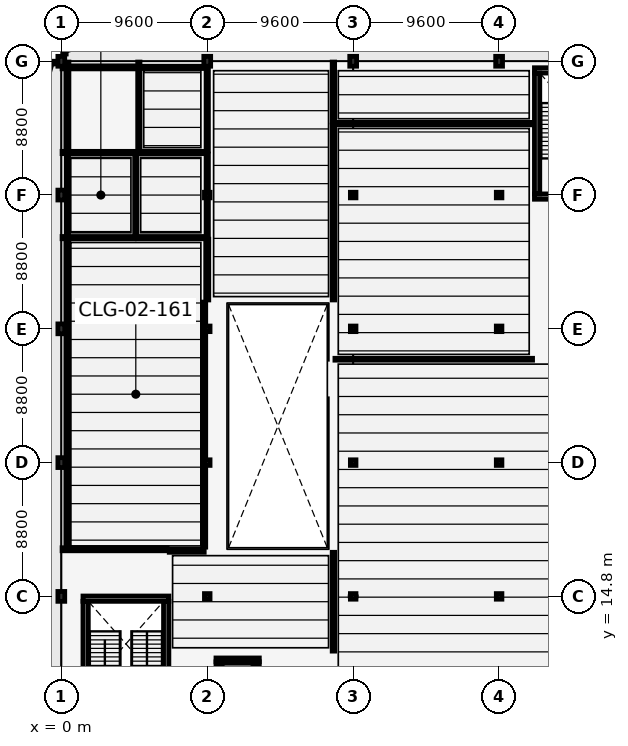
"""IFC4 building model, lengths in metres.
Left out: names, types, materials, properties, quantities, classifications, styles, units other than length and angle.
Written with IfcOpenShell. Run it as: python <this file> out.ifc"""

import sys

from ifc_helpers import new_model, si_unit, direction, frame, frame_2d, origin, origin_2d, place, context, subcontext, project, spatial, rectangle, i_section, extrude, element, fill, save


model = new_model("IFC4")
c1 = context("Model", 3, precision=1e-05, world=origin(), true_north=direction((0.0, 1.0)))
c2 = subcontext(c1, "Body", "Model", "MODEL_VIEW")
j1 = project(units=[si_unit("LENGTHUNIT", "METRE"), si_unit("PLANEANGLEUNIT", "RADIAN")], contexts=[c1])
p1 = place(None, origin())
s1 = spatial("IfcSite", under=j1, at=p1, CompositionType="ELEMENT")
p2 = place(p1, origin())
s2 = spatial("IfcBuilding", under=s1, at=p2, CompositionType="ELEMENT")
p3 = place(p2, frame((0.0, 0.0, 4.8)))
s3 = spatial("IfcBuildingStorey", under=s2, at=p3, CompositionType="ELEMENT", Elevation=4.8)
for number, where, z_axis, x_axis in (
    (1, (0.0, 14.8, 0.0), (0.0, 0.0, 1.0), (1.0, 0.0, 0.0)),
    (2, (0.0, 23.6, 0.0), (0.0, 0.0, 1.0), (1.0, 0.0, 0.0)),
    (3, (0.0, 32.4, 0.0), (0.0, 0.0, 1.0), (1.0, 0.0, 0.0)),
    (4, (0.0, 41.2, 0.0), (0.0, 0.0, 1.0), (1.0, 0.0, 0.0)),
    (5, (0.0, 50.0, 0.0), (0.0, 0.0, 1.0), (1.0, 0.0, 0.0)),
):
    element("IfcColumn", number, at=place(p3, frame(where, z_axis=z_axis, x_axis=x_axis)), inside=s3, PredefinedType="COLUMN", context=c2, shape_type="SweptSolid", body=[
        extrude(rectangle(XDim=0.45, YDim=0.65, at=origin_2d()), origin(), (0.0, 0.0, 1.0), 4.8),
    ])
for number, where, z_axis, x_axis in (
    (6, (9.6, 14.8, 0.0), (0.0, 0.0, 1.0), (1.0, 0.0, 0.0)),
    (7, (9.6, 23.6, 0.0), (0.0, 0.0, 1.0), (1.0, 0.0, 0.0)),
    (8, (9.6, 32.4, 0.0), (0.0, 0.0, 1.0), (1.0, 0.0, 0.0)),
    (9, (9.6, 41.2, 0.0), (0.0, 0.0, 1.0), (1.0, 0.0, 0.0)),
):
    element("IfcColumn", number, at=place(p3, frame(where, z_axis=z_axis, x_axis=x_axis)), inside=s3, PredefinedType="COLUMN", context=c2, shape_type="SweptSolid", body=[
        extrude(i_section(OverallWidth=0.368, OverallDepth=0.368, WebThickness=0.015, FlangeThickness=0.024, FilletRadius=0.025, at=origin_2d()), origin(), (0.0, 0.0, 1.0), 4.8),
    ])
p4 = place(p3, frame((9.6, 50.0, 0.0), z_axis=(0.0, 0.0, 1.0), x_axis=(1.0, 0.0, 0.0)))
e10 = element("IfcColumn", 10, at=p4, inside=s3, PredefinedType="COLUMN", context=c2, shape_type="SweptSolid", body=[
    extrude(rectangle(XDim=0.45, YDim=0.65, at=origin_2d()), origin(), (0.0, 0.0, 1.0), 4.8),
])
for number, where, z_axis, x_axis in (
    (11, (19.2, 14.8, 0.0), (0.0, 0.0, 1.0), (1.0, 0.0, 0.0)),
    (12, (19.2, 23.6, 0.0), (0.0, 0.0, 1.0), (1.0, 0.0, 0.0)),
    (13, (19.2, 32.4, 0.0), (0.0, 0.0, 1.0), (1.0, 0.0, 0.0)),
    (14, (19.2, 41.2, 0.0), (0.0, 0.0, 1.0), (1.0, 0.0, 0.0)),
):
    element("IfcColumn", number, at=place(p3, frame(where, z_axis=z_axis, x_axis=x_axis)), inside=s3, PredefinedType="COLUMN", context=c2, shape_type="SweptSolid", body=[
        extrude(i_section(OverallWidth=0.368, OverallDepth=0.368, WebThickness=0.015, FlangeThickness=0.024, FilletRadius=0.025, at=origin_2d()), origin(), (0.0, 0.0, 1.0), 4.8),
    ])
p5 = place(p3, frame((19.2, 50.0, 0.0), z_axis=(0.0, 0.0, 1.0), x_axis=(1.0, 0.0, 0.0)))
e15 = element("IfcColumn", 15, at=p5, inside=s3, PredefinedType="COLUMN", context=c2, shape_type="SweptSolid", body=[
    extrude(rectangle(XDim=0.45, YDim=0.65, at=origin_2d()), origin(), (0.0, 0.0, 1.0), 4.8),
])
for number, where, z_axis, x_axis in (
    (16, (28.8, 14.8, 0.0), (0.0, 0.0, 1.0), (1.0, 0.0, 0.0)),
    (17, (28.8, 23.6, 0.0), (0.0, 0.0, 1.0), (1.0, 0.0, 0.0)),
    (18, (28.8, 32.4, 0.0), (0.0, 0.0, 1.0), (1.0, 0.0, 0.0)),
    (19, (28.8, 41.2, 0.0), (0.0, 0.0, 1.0), (1.0, 0.0, 0.0)),
):
    element("IfcColumn", number, at=place(p3, frame(where, z_axis=z_axis, x_axis=x_axis)), inside=s3, PredefinedType="COLUMN", context=c2, shape_type="SweptSolid", body=[
        extrude(i_section(OverallWidth=0.368, OverallDepth=0.368, WebThickness=0.015, FlangeThickness=0.024, FilletRadius=0.025, at=origin_2d()), origin(), (0.0, 0.0, 1.0), 4.8),
    ])
p6 = place(p3, frame((28.8, 50.0, 0.0), z_axis=(0.0, 0.0, 1.0), x_axis=(1.0, 0.0, 0.0)))
e20 = element("IfcColumn", 20, at=p6, inside=s3, PredefinedType="COLUMN", context=c2, shape_type="SweptSolid", body=[
    extrude(rectangle(XDim=0.45, YDim=0.65, at=origin_2d()), origin(), (0.0, 0.0, 1.0), 4.8),
])
p7 = place(p3, frame((1.425, 14.65, 0.0), z_axis=(0.0, 0.0, 1.0), x_axis=(1.0, 0.0, 0.0)))
e21 = element("IfcWall", 21, at=p7, inside=s3, PredefinedType="SHEAR", context=c2, shape_type="SweptSolid", body=[
    extrude(rectangle(XDim=5.65, YDim=0.35, at=frame_2d((2.825, 0.0))), origin(), (0.0, 0.0, 1.0), 4.55),
])
p8 = place(p3, frame((1.6, 6.525, 0.0), z_axis=(0.0, 0.0, 1.0), x_axis=(0.0, 1.0, 0.0)))
e22 = element("IfcWall", 22, at=p8, inside=s3, PredefinedType="SHEAR", context=c2, shape_type="SweptSolid", body=[
    extrude(rectangle(XDim=7.95, YDim=0.35, at=frame_2d((3.975, 0.0))), origin(), (0.0, 0.0, 1.0), 4.55),
])
p9 = place(p3, frame((6.9, 14.475, 0.0), z_axis=(0.0, 0.0, 1.0), x_axis=(0.0, -1.0, 0.0)))
e23 = element("IfcWall", 23, at=p9, inside=s3, PredefinedType="SHEAR", context=c2, shape_type="SweptSolid", body=[
    extrude(rectangle(XDim=7.95, YDim=0.35, at=frame_2d((3.975, 0.0))), origin(), (0.0, 0.0, 1.0), 4.55),
])
p10 = place(p9, frame((5.68, 0.0, 0.0)))
e24 = element("IfcOpeningElement", 24, at=p10, cuts=e23, PredefinedType="OPENING", context=c2, shape_type="SweptSolid", body=[
    extrude(rectangle(XDim=2.05, YDim=2.15, at=frame_2d((1.025, 1.075))), frame((0.0, 0.185, 0.0), z_axis=(0.0, -1.0, 0.0), x_axis=(1.0, 0.0, 0.0)), (0.0, 0.0, 1.0), 0.37),
])
for number, where, z_axis, x_axis in (
    (25, (36.775, 41.1, 0.0), (0.0, 0.0, 1.0), (-1.0, 0.0, 0.0)),
    (26, (31.125, 49.4, 0.0), (0.0, 0.0, 1.0), (1.0, 0.0, 0.0)),
):
    element("IfcWall", number, at=place(p3, frame(where, z_axis=z_axis, x_axis=x_axis)), inside=s3, PredefinedType="SHEAR", context=c2, shape_type="SweptSolid", body=[
        extrude(rectangle(XDim=5.65, YDim=0.35, at=frame_2d((2.825, 0.0))), origin(), (0.0, 0.0, 1.0), 4.55),
    ])
p11 = place(p3, frame((31.3, 41.275, 0.0), z_axis=(0.0, 0.0, 1.0), x_axis=(0.0, 1.0, 0.0)))
e27 = element("IfcWall", 27, at=p11, inside=s3, PredefinedType="SHEAR", context=c2, shape_type="SweptSolid", body=[
    extrude(rectangle(XDim=7.95, YDim=0.35, at=frame_2d((3.975, 0.0))), origin(), (0.0, 0.0, 1.0), 4.55),
])
p12 = place(p11, frame((0.22, 0.0, 0.0)))
e28 = element("IfcOpeningElement", 28, at=p12, cuts=e27, PredefinedType="OPENING", context=c2, shape_type="SweptSolid", body=[
    extrude(rectangle(XDim=2.05, YDim=2.15, at=frame_2d((1.025, 1.075))), frame((0.0, 0.185, 0.0), z_axis=(0.0, -1.0, 0.0), x_axis=(1.0, 0.0, 0.0)), (0.0, 0.0, 1.0), 0.37),
])
p13 = place(p3, frame((10.175, 10.625, 0.0), z_axis=(0.0, 0.0, 1.0), x_axis=(1.0, 0.0, 0.0)))
e29 = element("IfcWall", 29, at=p13, inside=s3, PredefinedType="SOLIDWALL", context=c2, shape_type="SweptSolid", body=[
    extrude(rectangle(XDim=2.85, YDim=0.25, at=frame_2d((1.425, 0.0))), origin(), (0.0, 0.0, 1.0), 4.55),
])
p14 = place(p13, frame((0.875, 0.0, 0.0)))
e30 = element("IfcOpeningElement", 30, at=p14, cuts=e29, PredefinedType="OPENING", context=c2, shape_type="SweptSolid", body=[
    extrude(rectangle(XDim=1.1, YDim=2.15, at=frame_2d((0.55, 1.075))), frame((0.0, 0.135, 0.0), z_axis=(0.0, -1.0, 0.0), x_axis=(1.0, 0.0, 0.0)), (0.0, 0.0, 1.0), 0.27),
])
for number, where, z_axis, x_axis in (
    (31, (10.3, 8.7, 0.0), (0.0, 0.0, 1.0), (0.0, 1.0, 0.0)),
    (32, (12.9, 10.5, 0.0), (0.0, 0.0, 1.0), (0.0, -1.0, 0.0)),
):
    element("IfcWall", number, at=place(p3, frame(where, z_axis=z_axis, x_axis=x_axis)), inside=s3, PredefinedType="SOLIDWALL", context=c2, shape_type="SweptSolid", body=[
        extrude(rectangle(XDim=1.8, YDim=0.25, at=frame_2d((0.9, 0.0))), origin(), (0.0, 0.0, 1.0), 4.55),
    ])
p15 = place(p3, frame((17.9, 11.2, 0.0), z_axis=(0.0, 0.0, 1.0), x_axis=(0.0, 1.0, 0.0)))
e33 = element("IfcWall", 33, at=p15, inside=s3, PredefinedType="PARTITIONING", context=c2, shape_type="SweptSolid", body=[
    extrude(rectangle(XDim=6.5, YDim=0.16, at=frame_2d((3.25, 0.0))), origin(), (0.0, 0.0, 1.0), 4.42),
])
p16 = place(p15, frame((0.559, 0.0, 0.0)))
e34 = element("IfcOpeningElement", 34, at=p16, cuts=e33, PredefinedType="OPENING", context=c2, shape_type="SweptSolid", body=[
    extrude(rectangle(XDim=1.8, YDim=2.15, at=frame_2d((0.9, 1.075))), frame((0.0, 0.09, 0.0), z_axis=(0.0, -1.0, 0.0), x_axis=(1.0, 0.0, 0.0)), (0.0, 0.0, 1.0), 0.18),
])
p17 = place(p3, frame((7.1, 17.8, 0.0), z_axis=(0.0, 0.0, 1.0), x_axis=(1.0, 0.0, 0.0)))
e35 = element("IfcWall", 35, at=p17, inside=s3, PredefinedType="PARTITIONING", context=c2, shape_type="SweptSolid", body=[
    extrude(rectangle(XDim=2.3, YDim=0.2, at=frame_2d((1.15, 0.0))), origin(), (0.0, 0.0, 1.0), 4.182),
])
p18 = place(p17, frame((0.35, 0.0, 0.0)))
e36 = element("IfcOpeningElement", 36, at=p18, cuts=e35, PredefinedType="OPENING", context=c2, shape_type="SweptSolid", body=[
    extrude(rectangle(XDim=1.6, YDim=2.15, at=frame_2d((0.8, 1.075))), frame((0.0, 0.11, 0.0), z_axis=(0.0, -1.0, 0.0), x_axis=(1.0, 0.0, 0.0)), (0.0, 0.0, 1.0), 0.22),
])
p19 = place(p3, frame((18.0, 30.4, 0.0), z_axis=(0.0, 0.0, 1.0), x_axis=(1.0, 0.0, 0.0)))
e37 = element("IfcWall", 37, at=p19, inside=s3, PredefinedType="PARTITIONING", context=c2, shape_type="SweptSolid", body=[
    extrude(rectangle(XDim=13.0, YDim=0.125, at=frame_2d((6.5, 0.0))), origin(), (0.0, 0.0, 1.0), 4.42),
])
p20 = place(p3, frame((18.0, 45.9, 0.0), z_axis=(0.0, 0.0, 1.0), x_axis=(1.0, 0.0, 0.0)))
e38 = element("IfcWall", 38, at=p20, inside=s3, PredefinedType="PARTITIONING", context=c2, shape_type="SweptSolid", body=[
    extrude(rectangle(XDim=13.0, YDim=0.16, at=frame_2d((6.5, 0.0))), origin(), (0.0, 0.0, 1.0), 4.42),
])
p21 = place(p20, frame((5.6, 0.0, 0.0)))
e39 = element("IfcOpeningElement", 39, at=p21, cuts=e38, PredefinedType="OPENING", context=c2, shape_type="SweptSolid", body=[
    extrude(rectangle(XDim=1.8, YDim=2.15, at=frame_2d((0.9, 1.075))), frame((0.0, 0.09, 0.0), z_axis=(0.0, -1.0, 0.0), x_axis=(1.0, 0.0, 0.0)), (0.0, 0.0, 1.0), 0.18),
])
p22 = place(p3, frame((17.9, 34.3, 0.0), z_axis=(0.0, 0.0, 1.0), x_axis=(0.0, 1.0, 0.0)))
e40 = element("IfcWall", 40, at=p22, inside=s3, PredefinedType="PARTITIONING", context=c2, shape_type="SweptSolid", body=[
    extrude(rectangle(XDim=11.5, YDim=0.16, at=frame_2d((5.75, 0.0))), origin(), (0.0, 0.0, 1.0), 4.42),
])
p23 = place(p22, frame((3.952, 0.0, 0.0)))
e41 = element("IfcOpeningElement", 41, at=p23, cuts=e40, PredefinedType="OPENING", context=c2, shape_type="SweptSolid", body=[
    extrude(rectangle(XDim=1.8, YDim=2.15, at=frame_2d((0.9, 1.075))), frame((0.0, 0.09, 0.0), z_axis=(0.0, -1.0, 0.0), x_axis=(1.0, 0.0, 0.0)), (0.0, 0.0, 1.0), 0.18),
])
p24 = place(p3, frame((17.9, 46.0, 0.0), z_axis=(0.0, 0.0, 1.0), x_axis=(0.0, 1.0, 0.0)))
e42 = element("IfcWall", 42, at=p24, inside=s3, PredefinedType="PARTITIONING", context=c2, shape_type="SweptSolid", body=[
    extrude(rectangle(XDim=3.95, YDim=0.16, at=frame_2d((1.975, 0.0))), origin(), (0.0, 0.0, 1.0), 4.42),
])
p25 = place(p24, frame((0.861, 0.0, 0.0)))
e43 = element("IfcOpeningElement", 43, at=p25, cuts=e42, PredefinedType="OPENING", context=c2, shape_type="SweptSolid", body=[
    extrude(rectangle(XDim=1.8, YDim=2.15, at=frame_2d((0.9, 1.075))), frame((0.0, 0.09, 0.0), z_axis=(0.0, -1.0, 0.0), x_axis=(1.0, 0.0, 0.0)), (0.0, 0.0, 1.0), 0.18),
])
p26 = place(p3, frame((9.6, 34.3, 0.0), z_axis=(0.0, 0.0, 1.0), x_axis=(0.0, 1.0, 0.0)))
e44 = element("IfcWall", 44, at=p26, inside=s3, PredefinedType="PARTITIONING", context=c2, shape_type="SweptSolid", body=[
    extrude(rectangle(XDim=4.0, YDim=0.2, at=frame_2d((2.0, 0.0))), origin(), (0.0, 0.0, 1.0), 4.076),
])
p27 = place(p26, frame((1.2, 0.0, 0.0)))
e45 = element("IfcOpeningElement", 45, at=p27, cuts=e44, PredefinedType="OPENING", context=c2, shape_type="SweptSolid", body=[
    extrude(rectangle(XDim=1.6, YDim=2.15, at=frame_2d((0.8, 1.075))), frame((0.0, 0.11, 0.0), z_axis=(0.0, -1.0, 0.0), x_axis=(1.0, 0.0, 0.0)), (0.0, 0.0, 1.0), 0.22),
])
p28 = place(p3, frame((0.05, 38.4, 0.0), z_axis=(0.0, 0.0, 1.0), x_axis=(1.0, 0.0, 0.0)))
e46 = element("IfcWall", 46, at=p28, inside=s3, PredefinedType="PARTITIONING", context=c2, shape_type="SweptSolid", body=[
    extrude(rectangle(XDim=4.75, YDim=0.15, at=frame_2d((2.375, 0.0))), origin(), (0.0, 0.0, 1.0), 4.182),
])
p29 = place(p3, frame((5.0, 38.4, 0.0), z_axis=(0.0, 0.0, 1.0), x_axis=(1.0, 0.0, 0.0)))
e47 = element("IfcWall", 47, at=p29, inside=s3, PredefinedType="PARTITIONING", context=c2, shape_type="SweptSolid", body=[
    extrude(rectangle(XDim=4.4, YDim=0.15, at=frame_2d((2.2, 0.0))), origin(), (0.0, 0.0, 1.0), 4.182),
])
p30 = place(p3, frame((9.6, 38.5, 0.0), z_axis=(0.0, 0.0, 1.0), x_axis=(0.0, 1.0, 0.0)))
e48 = element("IfcWall", 48, at=p30, inside=s3, PredefinedType="PARTITIONING", context=c2, shape_type="SweptSolid", body=[
    extrude(rectangle(XDim=5.4, YDim=0.15, at=frame_2d((2.7, 0.0))), origin(), (0.0, 0.0, 1.0), 4.076),
])
p31 = place(p30, frame((0.549, 0.0, 0.0)))
e49 = element("IfcOpeningElement", 49, at=p31, cuts=e48, PredefinedType="OPENING", context=c2, shape_type="SweptSolid", body=[
    extrude(rectangle(XDim=0.9, YDim=2.15, at=frame_2d((0.45, 1.075))), frame((0.0, 0.085, 0.0), z_axis=(0.0, -1.0, 0.0), x_axis=(1.0, 0.0, 0.0)), (0.0, 0.0, 1.0), 0.17),
])
p32 = place(p3, frame((9.6, 44.1, 0.0), z_axis=(0.0, 0.0, 1.0), x_axis=(0.0, 1.0, 0.0)))
e50 = element("IfcWall", 50, at=p32, inside=s3, PredefinedType="PARTITIONING", context=c2, shape_type="SweptSolid", body=[
    extrude(rectangle(XDim=5.85, YDim=0.15, at=frame_2d((2.925, 0.0))), origin(), (0.0, 0.0, 1.0), 4.076),
])
p33 = place(p32, frame((2.45, 0.0, 0.0)))
e51 = element("IfcOpeningElement", 51, at=p33, cuts=e50, PredefinedType="OPENING", context=c2, shape_type="SweptSolid", body=[
    extrude(rectangle(XDim=0.95, YDim=2.15, at=frame_2d((0.475, 1.075))), frame((0.0, 0.085, 0.0), z_axis=(0.0, -1.0, 0.0), x_axis=(1.0, 0.0, 0.0)), (0.0, 0.0, 1.0), 0.17),
])
p34 = place(p3, frame((4.9, 38.5, 0.0), z_axis=(0.0, 0.0, 1.0), x_axis=(0.0, 1.0, 0.0)))
e52 = element("IfcWall", 52, at=p34, inside=s3, PredefinedType="PARTITIONING", context=c2, shape_type="SweptSolid", body=[
    extrude(rectangle(XDim=5.4, YDim=0.15, at=frame_2d((2.7, 0.0))), origin(), (0.0, 0.0, 1.0), 4.42),
])
p35 = place(p3, frame((0.05, 44.0, 0.0), z_axis=(0.0, 0.0, 1.0), x_axis=(1.0, 0.0, 0.0)))
e53 = element("IfcWall", 53, at=p35, inside=s3, PredefinedType="PARTITIONING", context=c2, shape_type="SweptSolid", body=[
    extrude(rectangle(XDim=4.75, YDim=0.15, at=frame_2d((2.375, 0.0))), origin(), (0.0, 0.0, 1.0), 4.42),
])
p36 = place(p3, frame((5.2, 44.0, 0.0), z_axis=(0.0, 0.0, 1.0), x_axis=(1.0, 0.0, 0.0)))
e54 = element("IfcWall", 54, at=p36, inside=s3, PredefinedType="PARTITIONING", context=c2, shape_type="SweptSolid", body=[
    extrude(rectangle(XDim=4.2, YDim=0.15, at=frame_2d((2.1, 0.0))), origin(), (0.0, 0.0, 1.0), 4.42),
])
p37 = place(p3, frame((5.1, 44.1, 0.0), z_axis=(0.0, 0.0, 1.0), x_axis=(0.0, 1.0, 0.0)))
e55 = element("IfcWall", 55, at=p37, inside=s3, PredefinedType="PARTITIONING", context=c2, shape_type="SweptSolid", body=[
    extrude(rectangle(XDim=5.85, YDim=0.15, at=frame_2d((2.925, 0.0))), origin(), (0.0, 0.0, 1.0), 4.42),
])
p38 = place(p3, frame((0.05, 17.9, 0.0), z_axis=(0.0, 0.0, 1.0), x_axis=(1.0, 0.0, 0.0)))
e56 = element("IfcWall", 56, at=p38, inside=s3, PredefinedType="PARTITIONING", context=c2, shape_type="SweptSolid", body=[
    extrude(rectangle(XDim=6.91, YDim=0.2, at=frame_2d((3.455, 0.0))), origin(), (0.0, 0.0, 1.0), 4.182),
])
p39 = place(p3, frame((0.4, 18.04, 0.0), z_axis=(0.0, 0.0, 1.0), x_axis=(0.0, 1.0, 0.0)))
e57 = element("IfcWall", 57, at=p39, inside=s3, PredefinedType="PARTITIONING", context=c2, shape_type="SweptSolid", body=[
    extrude(rectangle(XDim=20.12, YDim=0.2, at=frame_2d((10.06, 0.0))), origin(), (0.0, 0.0, 1.0), 4.42),
])
p40 = place(p3, frame((9.4, 18.04, 0.0), z_axis=(0.0, 0.0, 1.0), x_axis=(0.0, 1.0, 0.0)))
e58 = element("IfcWall", 58, at=p40, inside=s3, PredefinedType="PARTITIONING", context=c2, shape_type="SweptSolid", body=[
    extrude(rectangle(XDim=16.12, YDim=0.2, at=frame_2d((8.06, 0.0))), origin(), (0.0, 0.0, 1.0), 4.066),
])
p41 = place(p3, frame((0.4, 38.64, 0.0), z_axis=(0.0, 0.0, 1.0), x_axis=(0.0, 1.0, 0.0)))
e59 = element("IfcWall", 59, at=p41, inside=s3, PredefinedType="PARTITIONING", context=c2, shape_type="SweptSolid", body=[
    extrude(rectangle(XDim=5.12, YDim=0.15, at=frame_2d((2.56, 0.0))), origin(), (0.0, 0.0, 1.0), 4.42),
])
p42 = place(p41, frame((0.36, 0.0, 0.0)))
e60 = element("IfcOpeningElement", 60, at=p42, cuts=e59, PredefinedType="OPENING", context=c2, shape_type="SweptSolid", body=[
    extrude(rectangle(XDim=0.9, YDim=2.15, at=frame_2d((0.45, 1.075))), frame((0.0, 0.085, 0.0), z_axis=(0.0, -1.0, 0.0), x_axis=(1.0, 0.0, 0.0)), (0.0, 0.0, 1.0), 0.17),
])
p43 = place(p3, frame((5.34, 49.6, 0.0), z_axis=(0.0, 0.0, 1.0), x_axis=(1.0, 0.0, 0.0)))
e61 = element("IfcWall", 61, at=p43, inside=s3, PredefinedType="PARTITIONING", context=c2, shape_type="SweptSolid", body=[
    extrude(rectangle(XDim=3.92, YDim=0.15, at=frame_2d((1.96, 0.0))), origin(), (0.0, 0.0, 1.0), 4.42),
])
p44 = place(p3, frame((0.05, 49.6, 0.0), z_axis=(0.0, 0.0, 1.0), x_axis=(1.0, 0.0, 0.0)))
e62 = element("IfcWall", 62, at=p44, inside=s3, PredefinedType="PARTITIONING", context=c2, shape_type="SweptSolid", body=[
    extrude(rectangle(XDim=4.81, YDim=0.2, at=frame_2d((2.405, 0.0))), origin(), (0.0, 0.0, 1.0), 4.42),
])
p45 = place(p44, frame((1.905, 0.0, 0.0)))
e63 = element("IfcOpeningElement", 63, at=p45, cuts=e62, PredefinedType="OPENING", context=c2, shape_type="SweptSolid", body=[
    extrude(rectangle(XDim=1.0, YDim=2.15, at=frame_2d((0.5, 1.075))), frame((0.0, 0.11, 0.0), z_axis=(0.0, -1.0, 0.0), x_axis=(1.0, 0.0, 0.0)), (0.0, 0.0, 1.0), 0.22),
])
p46 = place(p3, frame((0.4, 44.24, 0.0), z_axis=(0.0, 0.0, 1.0), x_axis=(0.0, 1.0, 0.0)))
e64 = element("IfcWall", 64, at=p46, inside=s3, PredefinedType="PARTITIONING", context=c2, shape_type="SweptSolid", body=[
    extrude(rectangle(XDim=5.71, YDim=0.2, at=frame_2d((2.855, 0.0))), origin(), (0.0, 0.0, 1.0), 4.42),
])
p47 = place(p12, origin())
e65 = element("IfcDoor", 65, at=p47, inside=s3, OperationType="DOUBLE_DOOR_SINGLE_SWING", PredefinedType="DOOR", context=c2, shape_type="SweptSolid", body=[
    extrude(rectangle(XDim=2.05, YDim=2.15, at=frame_2d((1.025, 1.075))), frame((0.0, 0.025, 0.0), z_axis=(0.0, -1.0, 0.0), x_axis=(1.0, 0.0, 0.0)), (0.0, 0.0, 1.0), 0.05),
])
fill(e28, e65)
p48 = place(p14, origin())
e66 = element("IfcDoor", 66, at=p48, inside=s3, OperationType="DOUBLE_DOOR_SLIDING", PredefinedType="DOOR", context=c2, shape_type="SweptSolid", body=[
    extrude(rectangle(XDim=1.1, YDim=2.15, at=frame_2d((0.55, 1.075))), frame((0.0, 0.025, 0.0), z_axis=(0.0, -1.0, 0.0), x_axis=(1.0, 0.0, 0.0)), (0.0, 0.0, 1.0), 0.05),
])
fill(e30, e66)
p49 = place(p16, origin())
e67 = element("IfcDoor", 67, at=p49, inside=s3, OperationType="DOUBLE_DOOR_SINGLE_SWING", PredefinedType="DOOR", context=c2, shape_type="SweptSolid", body=[
    extrude(rectangle(XDim=1.8, YDim=2.15, at=frame_2d((0.9, 1.075))), frame((0.0, 0.025, 0.0), z_axis=(0.0, -1.0, 0.0), x_axis=(1.0, 0.0, 0.0)), (0.0, 0.0, 1.0), 0.05),
])
fill(e34, e67)
p50 = place(p18, origin())
e68 = element("IfcDoor", 68, at=p50, inside=s3, OperationType="DOUBLE_DOOR_SINGLE_SWING", PredefinedType="DOOR", context=c2, shape_type="SweptSolid", body=[
    extrude(rectangle(XDim=1.6, YDim=2.15, at=frame_2d((0.8, 1.075))), frame((0.0, 0.025, 0.0), z_axis=(0.0, -1.0, 0.0), x_axis=(1.0, 0.0, 0.0)), (0.0, 0.0, 1.0), 0.05),
])
fill(e36, e68)
p51 = place(p21, origin())
e69 = element("IfcDoor", 69, at=p51, inside=s3, OperationType="DOUBLE_DOOR_SINGLE_SWING", PredefinedType="DOOR", context=c2, shape_type="SweptSolid", body=[
    extrude(rectangle(XDim=1.8, YDim=2.15, at=frame_2d((0.9, 1.075))), frame((0.0, 0.025, 0.0), z_axis=(0.0, -1.0, 0.0), x_axis=(1.0, 0.0, 0.0)), (0.0, 0.0, 1.0), 0.05),
])
fill(e39, e69)
p52 = place(p23, origin())
e70 = element("IfcDoor", 70, at=p52, inside=s3, OperationType="DOUBLE_DOOR_SINGLE_SWING", PredefinedType="DOOR", context=c2, shape_type="SweptSolid", body=[
    extrude(rectangle(XDim=1.8, YDim=2.15, at=frame_2d((0.9, 1.075))), frame((0.0, 0.025, 0.0), z_axis=(0.0, -1.0, 0.0), x_axis=(1.0, 0.0, 0.0)), (0.0, 0.0, 1.0), 0.05),
])
fill(e41, e70)
p53 = place(p25, origin())
e71 = element("IfcDoor", 71, at=p53, inside=s3, OperationType="DOUBLE_DOOR_SINGLE_SWING", PredefinedType="DOOR", context=c2, shape_type="SweptSolid", body=[
    extrude(rectangle(XDim=1.8, YDim=2.15, at=frame_2d((0.9, 1.075))), frame((0.0, 0.025, 0.0), z_axis=(0.0, -1.0, 0.0), x_axis=(1.0, 0.0, 0.0)), (0.0, 0.0, 1.0), 0.05),
])
fill(e43, e71)
p54 = place(p27, origin())
e72 = element("IfcDoor", 72, at=p54, inside=s3, OperationType="DOUBLE_DOOR_SINGLE_SWING", PredefinedType="DOOR", context=c2, shape_type="SweptSolid", body=[
    extrude(rectangle(XDim=1.6, YDim=2.15, at=frame_2d((0.8, 1.075))), frame((0.0, 0.025, 0.0), z_axis=(0.0, -1.0, 0.0), x_axis=(1.0, 0.0, 0.0)), (0.0, 0.0, 1.0), 0.05),
])
fill(e45, e72)
p55 = place(p31, origin())
e73 = element("IfcDoor", 73, at=p55, inside=s3, OperationType="SINGLE_SWING_RIGHT", PredefinedType="DOOR", context=c2, shape_type="SweptSolid", body=[
    extrude(rectangle(XDim=0.9, YDim=2.15, at=frame_2d((0.45, 1.075))), frame((0.0, 0.025, 0.0), z_axis=(0.0, -1.0, 0.0), x_axis=(1.0, 0.0, 0.0)), (0.0, 0.0, 1.0), 0.05),
])
fill(e49, e73)
p56 = place(p33, origin())
e74 = element("IfcDoor", 74, at=p56, inside=s3, OperationType="SINGLE_SWING_LEFT", PredefinedType="DOOR", context=c2, shape_type="SweptSolid", body=[
    extrude(rectangle(XDim=0.95, YDim=2.15, at=frame_2d((0.475, 1.075))), frame((0.0, 0.025, 0.0), z_axis=(0.0, -1.0, 0.0), x_axis=(1.0, 0.0, 0.0)), (0.0, 0.0, 1.0), 0.05),
])
fill(e51, e74)
p57 = place(p42, origin())
e75 = element("IfcDoor", 75, at=p57, inside=s3, OperationType="SINGLE_SWING_RIGHT", PredefinedType="DOOR", context=c2, shape_type="SweptSolid", body=[
    extrude(rectangle(XDim=0.9, YDim=2.15, at=frame_2d((0.45, 1.075))), frame((0.0, 0.025, 0.0), z_axis=(0.0, -1.0, 0.0), x_axis=(1.0, 0.0, 0.0)), (0.0, 0.0, 1.0), 0.05),
])
fill(e60, e75)
p58 = place(p45, origin())
e76 = element("IfcDoor", 76, at=p58, inside=s3, OperationType="SINGLE_SWING_LEFT", PredefinedType="DOOR", context=c2, shape_type="SweptSolid", body=[
    extrude(rectangle(XDim=1.0, YDim=2.15, at=frame_2d((0.5, 1.075))), frame((0.0, 0.025, 0.0), z_axis=(0.0, -1.0, 0.0), x_axis=(1.0, 0.0, 0.0)), (0.0, 0.0, 1.0), 0.05),
])
fill(e63, e76)
save(model, sys.argv[1])
